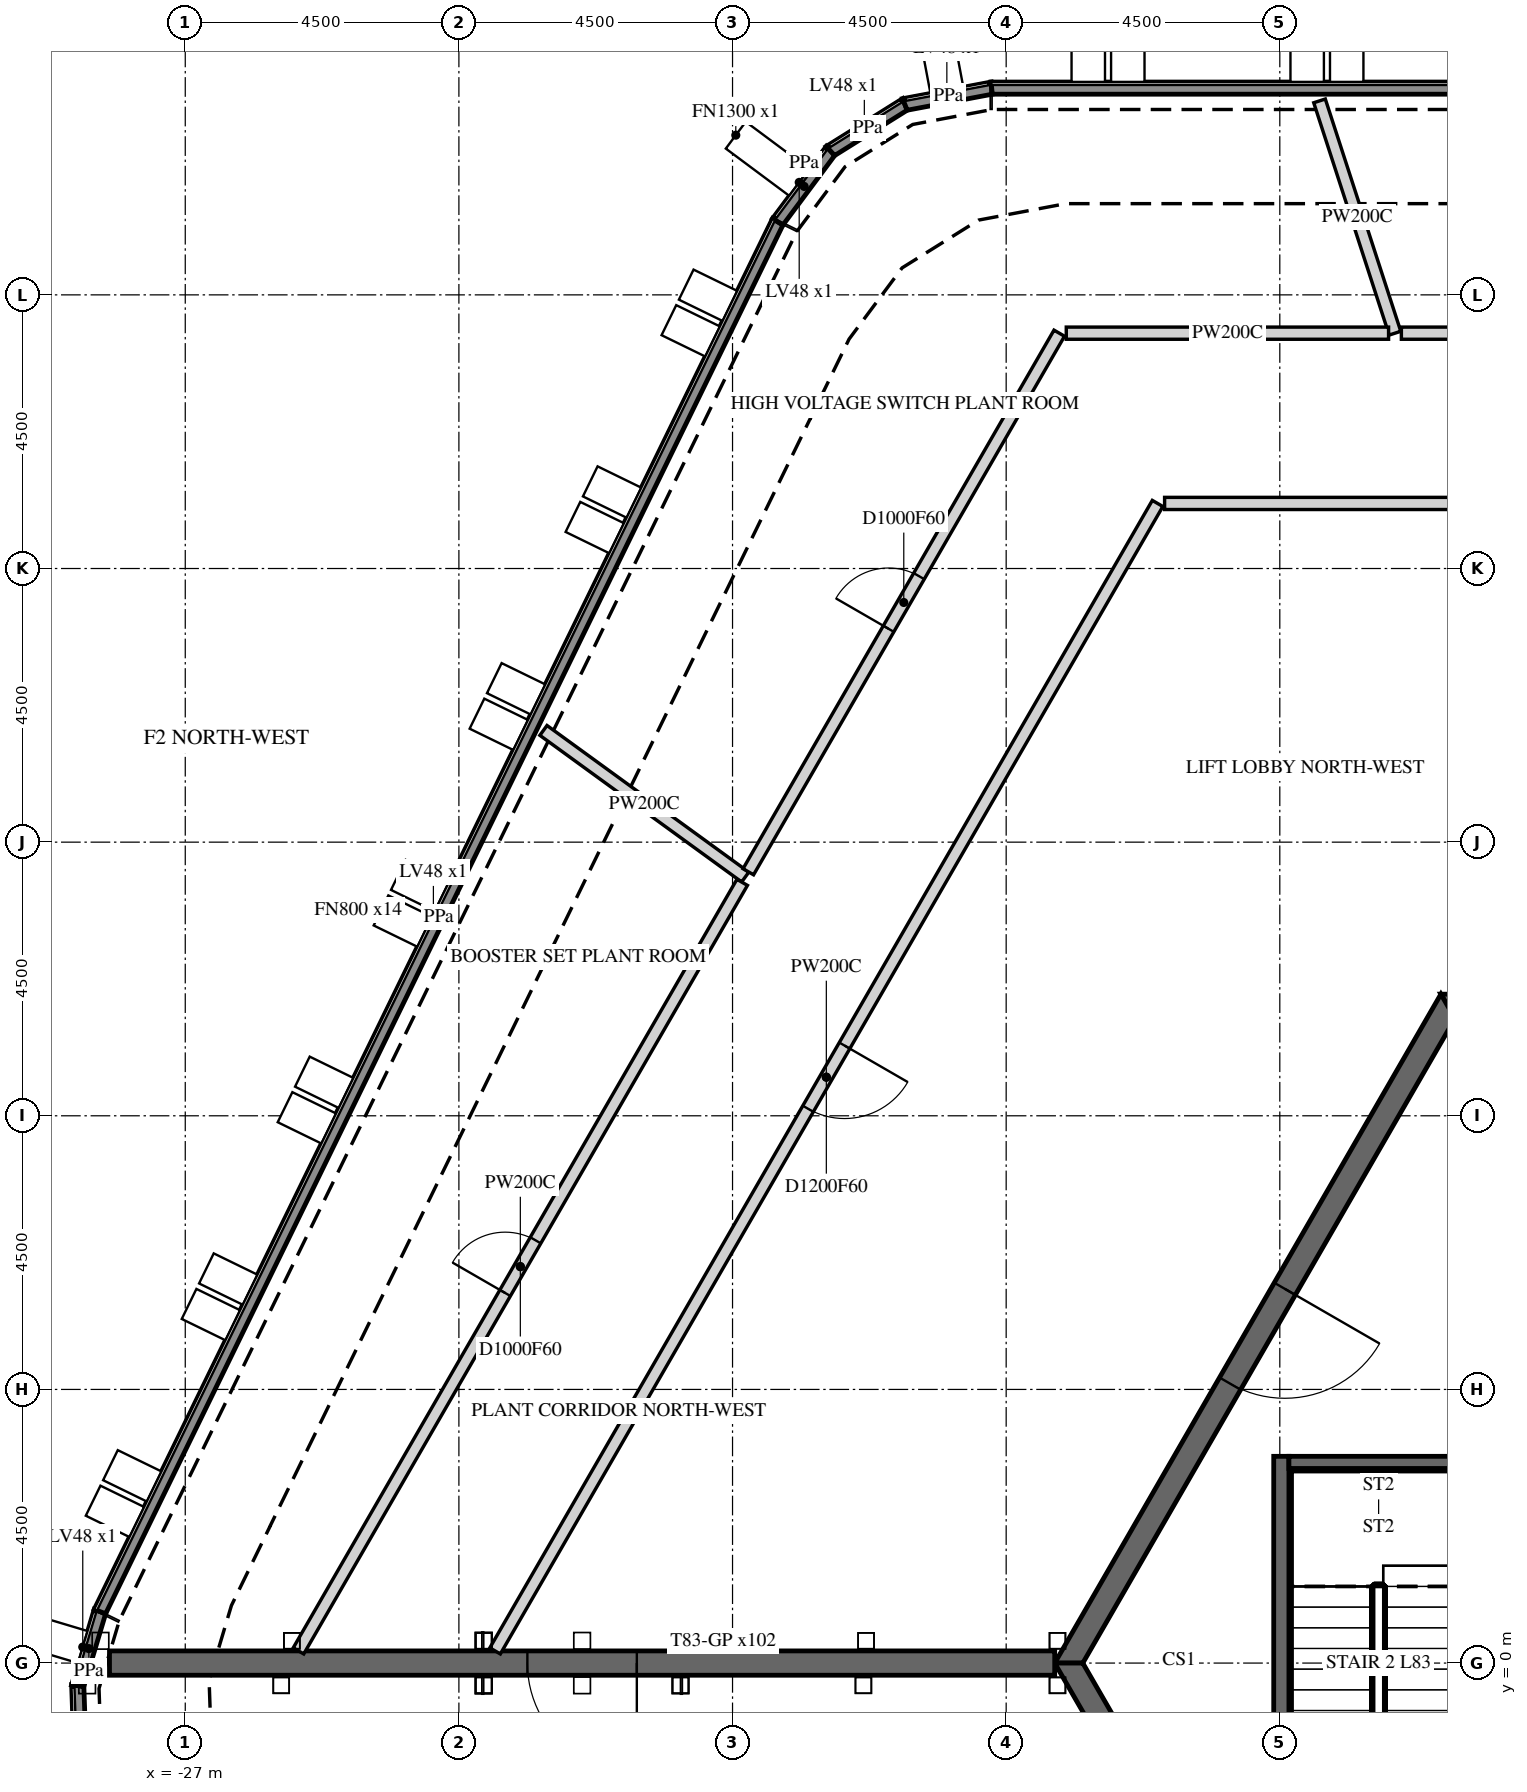
"""IFC4 building model, lengths in metres.
Left out: names, types, materials, properties, quantities, classifications, styles, units other than length and angle.
Written with IfcOpenShell. Run it as: python <this file> out.ifc"""

import sys

from ifc_helpers import new_model, si_unit, direction, frame, frame_2d, origin, place, context, subcontext, project, spatial, polyline, rectangle, outline, extrude, element, fill, save


model = new_model("IFC4")
c1 = context("Model", 3, precision=1e-05, world=origin(), true_north=direction((0.0, 1.0)))
c2 = subcontext(c1, "Body", "Model", "MODEL_VIEW")
j1 = project(units=[si_unit("LENGTHUNIT", "METRE"), si_unit("PLANEANGLEUNIT", "RADIAN")], contexts=[c1])
p1 = place(None, origin())
s1 = spatial("IfcSite", under=j1, at=p1, CompositionType="ELEMENT")
p2 = place(p1, origin())
s2 = spatial("IfcBuilding", under=s1, at=p2, CompositionType="ELEMENT")
p3 = place(p2, frame((0.0, 0.0, 343.5)))
s3 = spatial("IfcBuildingStorey", under=s2, at=p3, CompositionType="ELEMENT", Elevation=343.5)
p4 = place(p3, frame((-28.724, -1.636, 5.7), z_axis=(0.0, 0.0, 1.0), x_axis=(-0.034748174227, 0.999396099846, 0.0)))
e1 = element("IfcWall", 1, at=p4, inside=s3, PredefinedType="PARAPET", context=c2, shape_type="SweptSolid", body=[
    extrude(outline(polyline([(0.016, -0.1), (1.248, -0.1), (1.281, 0.1), (-0.016, 0.1), (0.016, -0.1)])), origin(), (0.0, 0.0, 1.0), 1.1),
])
p5 = place(p3, frame((-28.768, -0.372, 5.7), z_axis=(0.0, 0.0, 1.0), x_axis=(0.286784667578, 0.957995070156, 0.0)))
e2 = element("IfcWall", 2, at=p5, inside=s3, PredefinedType="PARAPET", context=c2, shape_type="SweptSolid", body=[
    extrude(outline(polyline([(0.016, -0.1), (1.265, -0.1), (1.281, 0.1), (-0.016, 0.1), (0.016, -0.1)])), origin(), (0.0, 0.0, 1.0), 1.1),
])
p6 = place(p3, frame((-28.403, 0.847, 5.7), z_axis=(0.0, 0.0, 1.0), x_axis=(0.438369906663, 0.898794651148, 0.0)))
e3 = element("IfcWall", 3, at=p6, inside=s3, PredefinedType="PARAPET", context=c2, shape_type="SweptSolid", body=[
    extrude(outline(polyline([(0.008, -0.1), (25.418, -0.1), (25.436, 0.1), (-0.008, 0.1), (0.008, -0.1)])), origin(), (0.0, 0.0, 1.0), 1.1),
])
p7 = place(p3, frame((-17.257, 23.701, 5.7), z_axis=(0.0, 0.0, 1.0), x_axis=(0.597118923952, 0.802152722777, 0.0)))
e4 = element("IfcWall", 4, at=p7, inside=s3, PredefinedType="PARAPET", context=c2, shape_type="SweptSolid", body=[
    extrude(outline(polyline([(0.009, -0.1), (1.434, -0.1), (1.471, 0.1), (-0.009, 0.1), (0.009, -0.1)])), origin(), (0.0, 0.0, 1.0), 1.1),
])
p8 = place(p3, frame((-16.389, 24.866, 5.7), z_axis=(0.0, 0.0, 1.0), x_axis=(0.848083831846, 0.529862070884, 0.0)))
e5 = element("IfcWall", 5, at=p8, inside=s3, PredefinedType="PARAPET", context=c2, shape_type="SweptSolid", body=[
    extrude(outline(polyline([(0.019, -0.1), (1.424, -0.1), (1.462, 0.1), (-0.019, 0.1), (0.019, -0.1)])), origin(), (0.0, 0.0, 1.0), 1.1),
])
p9 = place(p3, frame((-15.165, 25.631, 5.7), z_axis=(0.0, 0.0, 1.0), x_axis=(0.982729187844, 0.185049570005, 0.0)))
e6 = element("IfcWall", 6, at=p9, inside=s3, PredefinedType="PARAPET", context=c2, shape_type="SweptSolid", body=[
    extrude(outline(polyline([(0.019, -0.1), (1.443, -0.1), (1.462, 0.1), (-0.019, 0.1), (0.019, -0.1)])), origin(), (0.0, 0.0, 1.0), 1.1),
])
p10 = place(p3, frame((-13.738, 25.9, 5.7), z_axis=(0.0, 0.0, 1.0), x_axis=(1.0, 0.0, 0.0)))
e7 = element("IfcWall", 7, at=p10, inside=s3, PredefinedType="PARAPET", context=c2, shape_type="SweptSolid", body=[
    extrude(outline(polyline([(0.009, -0.1), (25.419, -0.1), (25.435, 0.1), (-0.009, 0.1), (0.009, -0.1)])), origin(), (0.0, 0.0, 1.0), 1.1),
])
p11 = place(p3, frame((-6.235, 10.8, -0.3), z_axis=(0.0, 0.0, 1.0), x_axis=(-0.499996419489, -0.866027470984, 0.0)))
e8 = element("IfcWall", 8, at=p11, inside=s3, PredefinedType="SHEAR", context=c2, shape_type="SweptSolid", body=[
    extrude(outline(polyline([(-0.115, -0.2), (12.586, -0.2), (12.355, 0.2), (0.115, 0.2), (-0.115, -0.2)])), origin(), (0.0, 0.0, 1.0), 5.8),
])
p12 = place(p11, frame((5.364, 0.0, 0.3)))
e9 = element("IfcOpeningElement", 9, at=p12, cuts=e8, PredefinedType="OPENING", context=c2, shape_type="SweptSolid", body=[
    extrude(rectangle(XDim=1.8, YDim=2.4, at=frame_2d((0.9, 1.2))), frame((0.0, 0.21, 0.0), z_axis=(0.0, -1.0, 0.0), x_axis=(1.0, 0.0, 0.0)), (0.0, 0.0, 1.0), 0.42),
])
p13 = place(p3, frame((-12.471, 0.0, -0.3), z_axis=(0.0, 0.0, 1.0), x_axis=(0.499996419489, -0.866027470984, 0.0)))
e10 = element("IfcWall", 10, at=p13, inside=s3, PredefinedType="SHEAR", context=c2, shape_type="SweptSolid", body=[
    extrude(outline(polyline([(-0.115, -0.2), (12.586, -0.2), (12.355, 0.2), (0.115, 0.2), (-0.115, -0.2)])), origin(), (0.0, 0.0, 1.0), 5.8),
])
p14 = place(p13, frame((5.306, 0.0, 0.3)))
e11 = element("IfcOpeningElement", 11, at=p14, cuts=e10, PredefinedType="OPENING", context=c2, shape_type="SweptSolid", body=[
    extrude(rectangle(XDim=1.8, YDim=2.4, at=frame_2d((0.9, 1.2))), frame((0.0, 0.21, 0.0), z_axis=(0.0, -1.0, 0.0), x_axis=(1.0, 0.0, 0.0)), (0.0, 0.0, 1.0), 0.42),
])
p15 = place(p3, frame((6.235, 10.8, -0.3), z_axis=(0.0, 0.0, 1.0), x_axis=(-1.0, 0.0, 0.0)))
e12 = element("IfcWall", 12, at=p15, inside=s3, PredefinedType="SHEAR", context=c2, shape_type="SweptSolid", body=[
    extrude(outline(polyline([(-0.115, -0.2), (12.586, -0.2), (12.355, 0.2), (0.115, 0.2), (-0.115, -0.2)])), origin(), (0.0, 0.0, 1.0), 5.8),
])
p16 = place(p3, frame((-12.702, 0.0, -0.3), z_axis=(0.0, 0.0, 1.0), x_axis=(-1.0, 0.0, 0.0)))
e13 = element("IfcWall", 13, at=p16, inside=s3, PredefinedType="SHEAR", context=c2, shape_type="SweptSolid", body=[
    extrude(rectangle(XDim=15.544, YDim=0.4, at=frame_2d((7.772, 0.0))), origin(), (0.0, 0.0, 1.0), 5.8),
])
p17 = place(p16, frame((6.872, 0.0, 0.3)))
e14 = element("IfcOpeningElement", 14, at=p17, cuts=e13, PredefinedType="OPENING", context=c2, shape_type="SweptSolid", body=[
    extrude(rectangle(XDim=1.8, YDim=2.4, at=frame_2d((0.9, 1.2))), frame((0.0, 0.21, 0.0), z_axis=(0.0, -1.0, 0.0), x_axis=(1.0, 0.0, 0.0)), (0.0, 0.0, 1.0), 0.42),
])
p18 = place(p3, frame((-8.975, -3.4, -0.25), z_axis=(0.0, 0.0, 1.0), x_axis=(0.0, 1.0, 0.0)))
e15 = element("IfcWall", 15, at=p18, inside=s3, PredefinedType="SHEAR", context=c2, shape_type="SweptSolid", body=[
    extrude(rectangle(XDim=6.8, YDim=0.25, at=frame_2d((3.4, 0.0))), origin(), (0.0, 0.0, 1.0), 5.75),
])
p19 = place(p3, frame((-8.85, 3.3, -0.25), z_axis=(0.0, 0.0, 1.0), x_axis=(1.0, 0.0, 0.0)))
e16 = element("IfcWall", 16, at=p19, inside=s3, PredefinedType="SHEAR", context=c2, shape_type="SweptSolid", body=[
    extrude(rectangle(XDim=2.95, YDim=0.2, at=frame_2d((1.475, 0.0))), origin(), (0.0, 0.0, 1.0), 5.75),
])
p20 = place(p3, frame((-21.11, 15.338, 0.0), z_axis=(0.0, 0.0, 1.0), x_axis=(0.808977915708, -0.587839035704, 0.0)))
e17 = element("IfcWall", 17, at=p20, inside=s3, PredefinedType="PARTITIONING", context=c2, shape_type="SweptSolid", body=[
    extrude(rectangle(XDim=4.103, YDim=0.2, at=frame_2d((2.051, 0.0))), origin(), (0.0, 0.0, 1.0), 5.5),
])
p21 = place(p3, frame((-25.138, 0.2, 0.0), z_axis=(0.0, 0.0, 1.0), x_axis=(0.499976837575, 0.866038776204, 0.0)))
e18 = element("IfcWall", 18, at=p21, inside=s3, PredefinedType="PARTITIONING", context=c2, shape_type="SweptSolid", body=[
    extrude(rectangle(XDim=14.594, YDim=0.2, at=frame_2d((7.297, 0.0))), origin(), (0.0, 0.0, 1.0), 5.5),
])
p22 = place(p21, frame((6.797, 0.0, 0.0)))
e19 = element("IfcOpeningElement", 19, at=p22, cuts=e18, PredefinedType="OPENING", context=c2, shape_type="SweptSolid", body=[
    extrude(rectangle(XDim=1.0, YDim=2.1, at=frame_2d((0.5, 1.05))), frame((0.0, 0.11, 0.0), z_axis=(0.0, -1.0, 0.0), x_axis=(1.0, 0.0, 0.0)), (0.0, 0.0, 1.0), 0.22),
])
p23 = place(p3, frame((-17.741, 13.013, 0.0), z_axis=(0.0, 0.0, 1.0), x_axis=(0.500015879365, 0.866016235635, 0.0)))
e20 = element("IfcWall", 20, at=p23, inside=s3, PredefinedType="PARTITIONING", context=c2, shape_type="SweptSolid", body=[
    extrude(rectangle(XDim=10.227, YDim=0.2, at=frame_2d((5.114, 0.0))), origin(), (0.0, 0.0, 1.0), 5.5),
])
p24 = place(p23, frame((4.614, 0.0, 0.0)))
e21 = element("IfcOpeningElement", 21, at=p24, cuts=e20, PredefinedType="OPENING", context=c2, shape_type="SweptSolid", body=[
    extrude(rectangle(XDim=1.0, YDim=2.1, at=frame_2d((0.5, 1.05))), frame((0.0, 0.11, 0.0), z_axis=(0.0, -1.0, 0.0), x_axis=(1.0, 0.0, 0.0)), (0.0, 0.0, 1.0), 0.22),
])
p25 = place(p3, frame((-11.01, 19.07, 0.0), z_axis=(0.0, 0.0, 1.0), x_axis=(-0.500012125972, -0.866018402738, 0.0)))
e22 = element("IfcWall", 22, at=p25, inside=s3, PredefinedType="PARTITIONING", context=c2, shape_type="SweptSolid", body=[
    extrude(rectangle(XDim=21.79, YDim=0.2, at=frame_2d((10.895, 0.0))), origin(), (0.0, 0.0, 1.0), 5.5),
])
p26 = place(p25, frame((10.295, 0.0, 0.0)))
e23 = element("IfcOpeningElement", 23, at=p26, cuts=e22, PredefinedType="OPENING", context=c2, shape_type="SweptSolid", body=[
    extrude(rectangle(XDim=1.2, YDim=2.1, at=frame_2d((0.6, 1.05))), frame((0.0, 0.11, 0.0), z_axis=(0.0, -1.0, 0.0), x_axis=(1.0, 0.0, 0.0)), (0.0, 0.0, 1.0), 0.22),
])
p27 = place(p3, frame((-8.347, 25.69, 0.0), z_axis=(0.0, 0.0, 1.0), x_axis=(0.308906015955, -0.951092568211, 0.0)))
e24 = element("IfcWall", 24, at=p27, inside=s3, PredefinedType="PARTITIONING", context=c2, shape_type="SweptSolid", body=[
    extrude(rectangle(XDim=4.017, YDim=0.2, at=frame_2d((2.008, 0.0))), origin(), (0.0, 0.0, 1.0), 5.5),
])
p28 = place(p3, frame((-7.211, 21.87, 0.0), z_axis=(0.0, 0.0, 1.0), x_axis=(-1.0, 0.0, 0.0)))
e25 = element("IfcWall", 25, at=p28, inside=s3, PredefinedType="PARTITIONING", context=c2, shape_type="SweptSolid", body=[
    extrude(rectangle(XDim=5.3, YDim=0.2, at=frame_2d((2.65, 0.0))), origin(), (0.0, 0.0, 1.0), 5.5),
])
p29 = place(p3, frame((10.779, 19.07, 0.0), z_axis=(0.0, 0.0, 1.0), x_axis=(-1.0, 0.0, 0.0)))
e26 = element("IfcWall", 26, at=p29, inside=s3, PredefinedType="PARTITIONING", context=c2, shape_type="SweptSolid", body=[
    extrude(rectangle(XDim=21.674, YDim=0.2, at=frame_2d((10.837, 0.0))), origin(), (0.0, 0.0, 1.0), 5.5),
])
p30 = place(p3, frame((-7.001, 21.87, 0.0), z_axis=(0.0, 0.0, 1.0), x_axis=(1.0, 0.0, 0.0)))
e27 = element("IfcWall", 27, at=p30, inside=s3, PredefinedType="PARTITIONING", context=c2, shape_type="SweptSolid", body=[
    extrude(rectangle(XDim=19.397, YDim=0.2, at=frame_2d((9.698, 0.0))), origin(), (0.0, 0.0, 1.0), 5.5),
])
p31 = place(p30, frame((9.198, 0.0, 0.0)))
e28 = element("IfcOpeningElement", 28, at=p31, cuts=e27, PredefinedType="OPENING", context=c2, shape_type="SweptSolid", body=[
    extrude(rectangle(XDim=1.0, YDim=2.1, at=frame_2d((0.5, 1.05))), frame((0.0, 0.11, 0.0), z_axis=(0.0, -1.0, 0.0), x_axis=(1.0, 0.0, 0.0)), (0.0, 0.0, 1.0), 0.22),
])
p32 = place(p12, origin())
e29 = element("IfcDoor", 29, at=p32, inside=s3, OperationType="DOUBLE_DOOR_SINGLE_SWING", PredefinedType="DOOR", context=c2, shape_type="SweptSolid", body=[
    extrude(rectangle(XDim=1.8, YDim=2.4, at=frame_2d((0.9, 1.2))), frame((0.0, 0.025, 0.0), z_axis=(0.0, -1.0, 0.0), x_axis=(1.0, 0.0, 0.0)), (0.0, 0.0, 1.0), 0.05),
])
fill(e9, e29)
p33 = place(p17, origin())
e30 = element("IfcDoor", 30, at=p33, inside=s3, OperationType="DOUBLE_DOOR_SINGLE_SWING", PredefinedType="DOOR", context=c2, shape_type="SweptSolid", body=[
    extrude(rectangle(XDim=1.8, YDim=2.4, at=frame_2d((0.9, 1.2))), frame((0.0, 0.025, 0.0), z_axis=(0.0, -1.0, 0.0), x_axis=(1.0, 0.0, 0.0)), (0.0, 0.0, 1.0), 0.05),
])
fill(e14, e30)
p34 = place(p22, origin())
e31 = element("IfcDoor", 31, at=p34, inside=s3, OperationType="SINGLE_SWING_RIGHT", PredefinedType="DOOR", context=c2, shape_type="SweptSolid", body=[
    extrude(rectangle(XDim=1.0, YDim=2.1, at=frame_2d((0.5, 1.05))), frame((0.0, 0.025, 0.0), z_axis=(0.0, -1.0, 0.0), x_axis=(1.0, 0.0, 0.0)), (0.0, 0.0, 1.0), 0.05),
])
fill(e19, e31)
p35 = place(p24, origin())
e32 = element("IfcDoor", 32, at=p35, inside=s3, OperationType="SINGLE_SWING_LEFT", PredefinedType="DOOR", context=c2, shape_type="SweptSolid", body=[
    extrude(rectangle(XDim=1.0, YDim=2.1, at=frame_2d((0.5, 1.05))), frame((0.0, 0.025, 0.0), z_axis=(0.0, -1.0, 0.0), x_axis=(1.0, 0.0, 0.0)), (0.0, 0.0, 1.0), 0.05),
])
fill(e21, e32)
p36 = place(p26, origin())
e33 = element("IfcDoor", 33, at=p36, inside=s3, OperationType="SINGLE_SWING_RIGHT", PredefinedType="DOOR", context=c2, shape_type="SweptSolid", body=[
    extrude(rectangle(XDim=1.2, YDim=2.1, at=frame_2d((0.6, 1.05))), frame((0.0, 0.025, 0.0), z_axis=(0.0, -1.0, 0.0), x_axis=(1.0, 0.0, 0.0)), (0.0, 0.0, 1.0), 0.05),
])
fill(e23, e33)
save(model, sys.argv[1])
